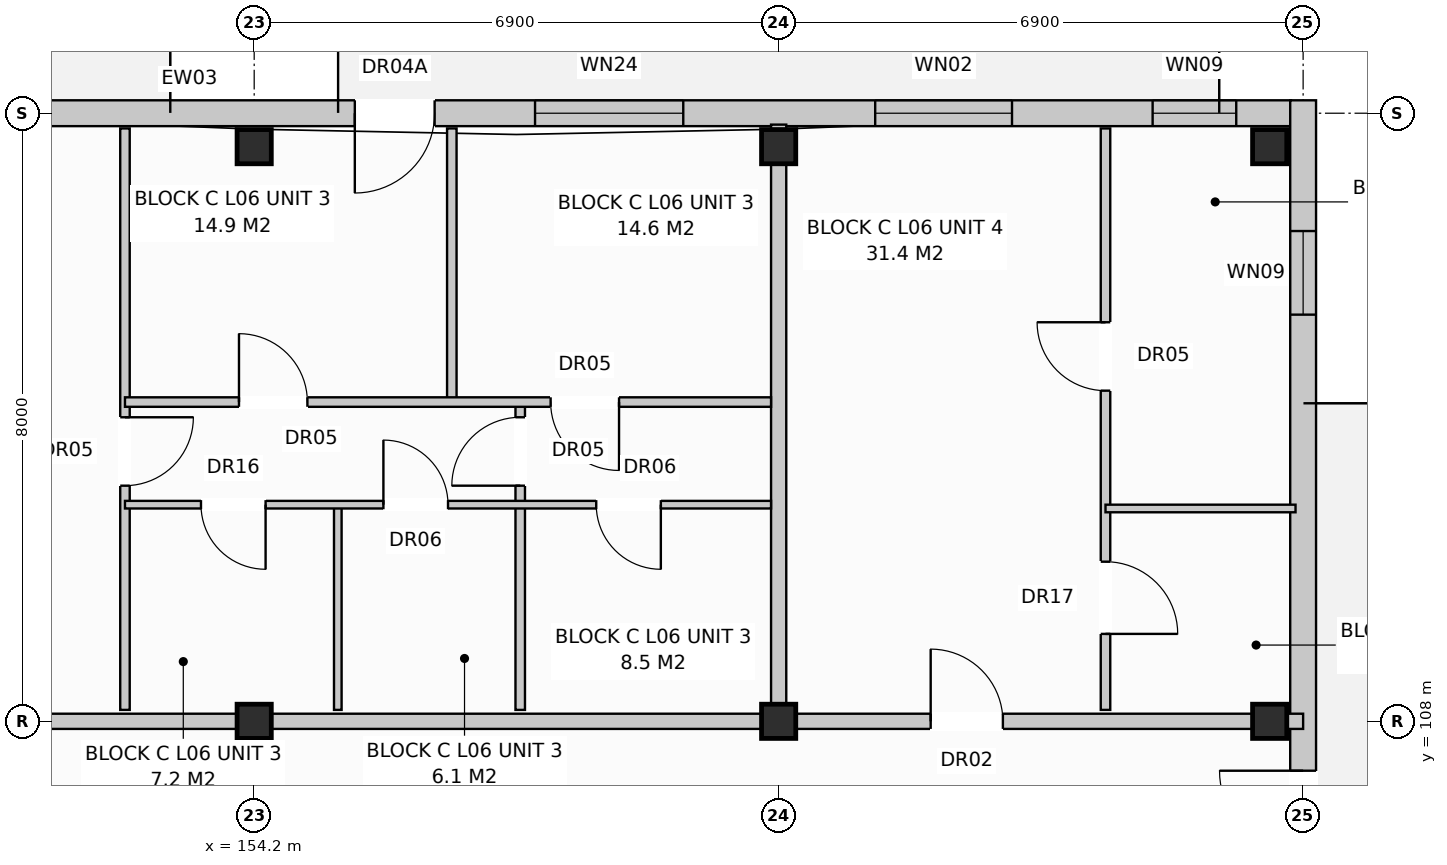
"""IFC4 building model, lengths in metres.
Left out: names, types, materials, properties, quantities, classifications, styles, units other than length and angle.
Written with IfcOpenShell. Run it as: python <this file> out.ifc"""

import sys

from ifc_helpers import new_model, si_unit, direction, frame, frame_2d, origin, origin_with_axes, origin_2d, place, context, subcontext, project, spatial, rectangle, extrude, element, fill, save


model = new_model("IFC4")
c1 = context("Model", 3, precision=1e-05, world=origin(), true_north=direction((0.0, 1.0)))
c2 = subcontext(c1, "Body", "Model", "MODEL_VIEW")
j1 = project(units=[si_unit("LENGTHUNIT", "METRE"), si_unit("PLANEANGLEUNIT", "RADIAN")], contexts=[c1])
p1 = place(None, origin())
s1 = spatial("IfcSite", under=j1, at=p1, CompositionType="ELEMENT")
p2 = place(p1, origin())
s2 = spatial("IfcBuilding", under=s1, at=p2, CompositionType="ELEMENT")
p3 = place(p2, frame((0.0, 0.0, 20.8)))
s3 = spatial("IfcBuildingStorey", under=s2, at=p3, CompositionType="ELEMENT", Elevation=20.8)
for number, where, z_axis, x_axis in (
    (1, (154.2, 108.0, 0.0), (0.0, 0.0, 1.0), (1.0, 0.0, 0.0)),
    (2, (154.2, 115.56, 0.0), (0.0, 0.0, 1.0), (1.0, 0.0, 0.0)),
    (3, (161.1, 108.0, 0.0), (0.0, 0.0, 1.0), (1.0, 0.0, 0.0)),
    (4, (161.1, 115.56, 0.0), (0.0, 0.0, 1.0), (1.0, 0.0, 0.0)),
    (5, (167.56, 108.0, 0.0), (0.0, 0.0, 1.0), (1.0, 0.0, 0.0)),
    (6, (167.56, 115.56, 0.0), (0.0, 0.0, 1.0), (1.0, 0.0, 0.0)),
):
    element("IfcColumn", number, at=place(p3, frame(where, z_axis=z_axis, x_axis=x_axis)), inside=s3, PredefinedType="COLUMN", context=c2, shape_type="SweptSolid", body=[
        extrude(rectangle(XDim=0.45, YDim=0.45, at=origin_2d()), origin(), (0.0, 0.0, 1.0), 3.2),
    ])
p4 = place(p3, frame((126.76, 116.0, 0.0), z_axis=(0.0, 0.0, 1.0), x_axis=(1.0, 0.0, 0.0)))
e7 = element("IfcWall", 7, at=p4, inside=s3, PredefinedType="STANDARD", context=c2, shape_type="SweptSolid", body=[
    extrude(rectangle(XDim=41.08, YDim=0.34, at=frame_2d((20.54, 0.0))), origin(), (0.0, 0.0, 1.0), 2.95),
])
p5 = place(p4, frame((2.464, 0.0, 0.0)))
e8 = element("IfcOpeningElement", 8, at=p5, cuts=e7, PredefinedType="OPENING", context=c2, shape_type="SweptSolid", body=[
    extrude(rectangle(XDim=1.05, YDim=2.12, at=frame_2d((0.525, 1.06))), frame((0.0, 0.182, 0.0), z_axis=(0.0, -1.0, 0.0), x_axis=(1.0, 0.0, 0.0)), (0.0, 0.0, 1.0), 0.364),
])
p6 = place(p4, frame((18.86, 0.0, 0.0)))
e9 = element("IfcOpeningElement", 9, at=p6, cuts=e7, PredefinedType="OPENING", context=c2, shape_type="SweptSolid", body=[
    extrude(rectangle(XDim=1.05, YDim=2.12, at=frame_2d((0.525, 1.06))), frame((0.0, 0.182, 0.0), z_axis=(0.0, -1.0, 0.0), x_axis=(1.0, 0.0, 0.0)), (0.0, 0.0, 1.0), 0.364),
])
p7 = place(p4, frame((28.764, 0.0, 0.0)))
e10 = element("IfcOpeningElement", 10, at=p7, cuts=e7, PredefinedType="OPENING", context=c2, shape_type="SweptSolid", body=[
    extrude(rectangle(XDim=1.05, YDim=2.12, at=frame_2d((0.525, 1.06))), frame((0.0, 0.182, 0.0), z_axis=(0.0, -1.0, 0.0), x_axis=(1.0, 0.0, 0.0)), (0.0, 0.0, 1.0), 0.364),
])
p8 = place(p4, frame((0.76, 0.0, 0.72)))
e11 = element("IfcOpeningElement", 11, at=p8, cuts=e7, PredefinedType="OPENING", context=c2, shape_type="SweptSolid", body=[
    extrude(rectangle(XDim=1.1, YDim=1.5, at=frame_2d((0.55, 0.75))), frame((0.0, 0.182, 0.0), z_axis=(0.0, -1.0, 0.0), x_axis=(1.0, 0.0, 0.0)), (0.0, 0.0, 1.0), 0.364),
])
p9 = place(p4, frame((4.31, 0.0, 0.8)))
e12 = element("IfcOpeningElement", 12, at=p9, cuts=e7, PredefinedType="OPENING", context=c2, shape_type="SweptSolid", body=[
    extrude(rectangle(XDim=1.8, YDim=1.7, at=frame_2d((0.9, 0.85))), frame((0.0, 0.182, 0.0), z_axis=(0.0, -1.0, 0.0), x_axis=(1.0, 0.0, 0.0)), (0.0, 0.0, 1.0), 0.364),
])
p10 = place(p4, frame((7.96, 0.0, 0.72)))
e13 = element("IfcOpeningElement", 13, at=p10, cuts=e7, PredefinedType="OPENING", context=c2, shape_type="SweptSolid", body=[
    extrude(rectangle(XDim=1.9, YDim=1.85, at=frame_2d((0.95, 0.925))), frame((0.0, 0.182, 0.0), z_axis=(0.0, -1.0, 0.0), x_axis=(1.0, 0.0, 0.0)), (0.0, 0.0, 1.0), 0.364),
])
p11 = place(p4, frame((11.66, 0.0, 0.72)))
e14 = element("IfcOpeningElement", 14, at=p11, cuts=e7, PredefinedType="OPENING", context=c2, shape_type="SweptSolid", body=[
    extrude(rectangle(XDim=1.1, YDim=1.5, at=frame_2d((0.55, 0.75))), frame((0.0, 0.182, 0.0), z_axis=(0.0, -1.0, 0.0), x_axis=(1.0, 0.0, 0.0)), (0.0, 0.0, 1.0), 0.364),
])
p12 = place(p4, frame((16.81, 0.0, 0.8)))
e15 = element("IfcOpeningElement", 15, at=p12, cuts=e7, PredefinedType="OPENING", context=c2, shape_type="SweptSolid", body=[
    extrude(rectangle(XDim=1.8, YDim=1.7, at=frame_2d((0.9, 0.85))), frame((0.0, 0.182, 0.0), z_axis=(0.0, -1.0, 0.0), x_axis=(1.0, 0.0, 0.0)), (0.0, 0.0, 1.0), 0.364),
])
p13 = place(p4, frame((22.26, 0.0, 0.72)))
e16 = element("IfcOpeningElement", 16, at=p13, cuts=e7, PredefinedType="OPENING", context=c2, shape_type="SweptSolid", body=[
    extrude(rectangle(XDim=1.9, YDim=1.85, at=frame_2d((0.95, 0.925))), frame((0.0, 0.182, 0.0), z_axis=(0.0, -1.0, 0.0), x_axis=(1.0, 0.0, 0.0)), (0.0, 0.0, 1.0), 0.364),
])
p14 = place(p4, frame((31.135, 0.0, 0.8)))
e17 = element("IfcOpeningElement", 17, at=p14, cuts=e7, PredefinedType="OPENING", context=c2, shape_type="SweptSolid", body=[
    extrude(rectangle(XDim=1.95, YDim=1.65, at=frame_2d((0.975, 0.825))), frame((0.0, 0.182, 0.0), z_axis=(0.0, -1.0, 0.0), x_axis=(1.0, 0.0, 0.0)), (0.0, 0.0, 1.0), 0.364),
])
p15 = place(p4, frame((35.61, 0.0, 0.8)))
e18 = element("IfcOpeningElement", 18, at=p15, cuts=e7, PredefinedType="OPENING", context=c2, shape_type="SweptSolid", body=[
    extrude(rectangle(XDim=1.8, YDim=1.7, at=frame_2d((0.9, 0.85))), frame((0.0, 0.182, 0.0), z_axis=(0.0, -1.0, 0.0), x_axis=(1.0, 0.0, 0.0)), (0.0, 0.0, 1.0), 0.364),
])
p16 = place(p4, frame((39.26, 0.0, 0.72)))
e19 = element("IfcOpeningElement", 19, at=p16, cuts=e7, PredefinedType="OPENING", context=c2, shape_type="SweptSolid", body=[
    extrude(rectangle(XDim=1.1, YDim=1.5, at=frame_2d((0.55, 0.75))), frame((0.0, 0.182, 0.0), z_axis=(0.0, -1.0, 0.0), x_axis=(1.0, 0.0, 0.0)), (0.0, 0.0, 1.0), 0.364),
])
p17 = place(p3, frame((168.0, 97.43, 0.0), z_axis=(0.0, 0.0, 1.0), x_axis=(0.0, 1.0, 0.0)))
e20 = element("IfcWall", 20, at=p17, inside=s3, PredefinedType="STANDARD", context=c2, shape_type="SweptSolid", body=[
    extrude(rectangle(XDim=18.74, YDim=0.34, at=frame_2d((9.37, 0.0))), origin(), (0.0, 0.0, 1.0), 2.95),
])
p18 = place(p17, frame((8.82, 0.0, 0.0)))
e21 = element("IfcOpeningElement", 21, at=p18, cuts=e20, PredefinedType="OPENING", context=c2, shape_type="SweptSolid", body=[
    extrude(rectangle(XDim=1.1, YDim=2.1, at=frame_2d((0.55, 1.05))), frame((0.0, 0.182, 0.0), z_axis=(0.0, -1.0, 0.0), x_axis=(1.0, 0.0, 0.0)), (0.0, 0.0, 1.0), 0.364),
])
p19 = place(p17, frame((1.72, 0.0, 0.72)))
e22 = element("IfcOpeningElement", 22, at=p19, cuts=e20, PredefinedType="OPENING", context=c2, shape_type="SweptSolid", body=[
    extrude(rectangle(XDim=1.1, YDim=1.5, at=frame_2d((0.55, 0.75))), frame((0.0, 0.182, 0.0), z_axis=(0.0, -1.0, 0.0), x_axis=(1.0, 0.0, 0.0)), (0.0, 0.0, 1.0), 0.364),
])
p20 = place(p17, frame((15.92, 0.0, 0.72)))
e23 = element("IfcOpeningElement", 23, at=p20, cuts=e20, PredefinedType="OPENING", context=c2, shape_type="SweptSolid", body=[
    extrude(rectangle(XDim=1.1, YDim=1.5, at=frame_2d((0.55, 0.75))), frame((0.0, 0.182, 0.0), z_axis=(0.0, -1.0, 0.0), x_axis=(1.0, 0.0, 0.0)), (0.0, 0.0, 1.0), 0.364),
])
p21 = place(p3, frame((161.1, 108.15, 0.0), z_axis=(0.0, 0.0, 1.0), x_axis=(0.0, 1.0, 0.0)))
e24 = element("IfcWall", 24, at=p21, inside=s3, PredefinedType="PARTITIONING", context=c2, shape_type="SweptSolid", body=[
    extrude(rectangle(XDim=7.7, YDim=0.2, at=frame_2d((3.85, 0.0))), origin(), (0.0, 0.0, 1.0), 2.39),
])
p22 = place(p3, frame((147.3, 108.0, 0.0), z_axis=(0.0, 0.0, 1.0), x_axis=(1.0, 0.0, 0.0)))
e25 = element("IfcWall", 25, at=p22, inside=s3, PredefinedType="PARTITIONING", context=c2, shape_type="SweptSolid", body=[
    extrude(rectangle(XDim=13.8, YDim=0.2, at=frame_2d((6.9, 0.0))), origin(), (0.0, 0.0, 1.0), 2.39),
])
p23 = place(p22, frame((2.4, 0.0, 0.0)))
e26 = element("IfcOpeningElement", 26, at=p23, cuts=e25, PredefinedType="OPENING", context=c2, shape_type="SweptSolid", body=[
    extrude(rectangle(XDim=0.95, YDim=2.15, at=frame_2d((0.475, 1.075))), frame((0.0, 0.112, 0.0), z_axis=(0.0, -1.0, 0.0), x_axis=(1.0, 0.0, 0.0)), (0.0, 0.0, 1.0), 0.224),
])
p24 = place(p3, frame((152.5, 108.15, 0.0), z_axis=(0.0, 0.0, 1.0), x_axis=(0.0, 1.0, 0.0)))
e27 = element("IfcWall", 27, at=p24, inside=s3, PredefinedType="PARTITIONING", context=c2, shape_type="SweptSolid", body=[
    extrude(rectangle(XDim=7.65, YDim=0.125, at=frame_2d((3.825, 0.0))), origin(), (0.0, 0.0, 1.0), 2.59),
])
p25 = place(p24, frame((2.95, 0.0, 0.0)))
e28 = element("IfcOpeningElement", 28, at=p25, cuts=e27, PredefinedType="OPENING", context=c2, shape_type="SweptSolid", body=[
    extrude(rectangle(XDim=0.9, YDim=2.1, at=frame_2d((0.45, 1.05))), frame((0.0, 0.074, 0.0), z_axis=(0.0, -1.0, 0.0), x_axis=(1.0, 0.0, 0.0)), (0.0, 0.0, 1.0), 0.149),
])
p26 = place(p3, frame((155.3, 108.15, 0.0), z_axis=(0.0, 0.0, 1.0), x_axis=(0.0, 1.0, 0.0)))
e29 = element("IfcWall", 29, at=p26, inside=s3, PredefinedType="PARTITIONING", context=c2, shape_type="SweptSolid", body=[
    extrude(rectangle(XDim=2.7, YDim=0.1, at=frame_2d((1.35, 0.0))), origin(), (0.0, 0.0, 1.0), 2.95),
])
p27 = place(p3, frame((157.7, 108.15, 0.0), z_axis=(0.0, 0.0, 1.0), x_axis=(0.0, 1.0, 0.0)))
e30 = element("IfcWall", 30, at=p27, inside=s3, PredefinedType="PARTITIONING", context=c2, shape_type="SweptSolid", body=[
    extrude(rectangle(XDim=4.05, YDim=0.125, at=frame_2d((2.025, 0.0))), origin(), (0.0, 0.0, 1.0), 2.95),
])
p28 = place(p27, frame((2.95, 0.0, 0.0)))
e31 = element("IfcOpeningElement", 31, at=p28, cuts=e30, PredefinedType="OPENING", context=c2, shape_type="SweptSolid", body=[
    extrude(rectangle(XDim=0.9, YDim=2.1, at=frame_2d((0.45, 1.05))), frame((0.0, 0.074, 0.0), z_axis=(0.0, -1.0, 0.0), x_axis=(1.0, 0.0, 0.0)), (0.0, 0.0, 1.0), 0.149),
])
p29 = place(p3, frame((156.8, 112.2, 0.0), z_axis=(0.0, 0.0, 1.0), x_axis=(0.0, 1.0, 0.0)))
e32 = element("IfcWall", 32, at=p29, inside=s3, PredefinedType="PARTITIONING", context=c2, shape_type="SweptSolid", body=[
    extrude(rectangle(XDim=3.6, YDim=0.125, at=frame_2d((1.8, 0.0))), origin(), (0.0, 0.0, 1.0), 2.95),
])
p30 = place(p3, frame((152.5, 110.85, 0.0), z_axis=(0.0, 0.0, 1.0), x_axis=(1.0, 0.0, 0.0)))
e33 = element("IfcWall", 33, at=p30, inside=s3, PredefinedType="PARTITIONING", context=c2, shape_type="SweptSolid", body=[
    extrude(rectangle(XDim=8.5, YDim=0.1, at=frame_2d((4.25, 0.0))), origin(), (0.0, 0.0, 1.0), 2.95),
])
p31 = place(p30, frame((1.0, 0.0, 0.0)))
e34 = element("IfcOpeningElement", 34, at=p31, cuts=e33, PredefinedType="OPENING", context=c2, shape_type="SweptSolid", body=[
    extrude(rectangle(XDim=0.85, YDim=2.1, at=frame_2d((0.425, 1.05))), frame((0.0, 0.062, 0.0), z_axis=(0.0, -1.0, 0.0), x_axis=(1.0, 0.0, 0.0)), (0.0, 0.0, 1.0), 0.124),
])
p32 = place(p30, frame((3.4, 0.0, 0.0)))
e35 = element("IfcOpeningElement", 35, at=p32, cuts=e33, PredefinedType="OPENING", context=c2, shape_type="SweptSolid", body=[
    extrude(rectangle(XDim=0.85, YDim=2.05, at=frame_2d((0.425, 1.025))), frame((0.0, 0.062, 0.0), z_axis=(0.0, -1.0, 0.0), x_axis=(1.0, 0.0, 0.0)), (0.0, 0.0, 1.0), 0.124),
])
p33 = place(p30, frame((6.2, 0.0, 0.0)))
e36 = element("IfcOpeningElement", 36, at=p33, cuts=e33, PredefinedType="OPENING", context=c2, shape_type="SweptSolid", body=[
    extrude(rectangle(XDim=0.85, YDim=2.05, at=frame_2d((0.425, 1.025))), frame((0.0, 0.062, 0.0), z_axis=(0.0, -1.0, 0.0), x_axis=(1.0, 0.0, 0.0)), (0.0, 0.0, 1.0), 0.124),
])
p34 = place(p3, frame((152.5, 112.2, 0.0), z_axis=(0.0, 0.0, 1.0), x_axis=(1.0, 0.0, 0.0)))
e37 = element("IfcWall", 37, at=p34, inside=s3, PredefinedType="PARTITIONING", context=c2, shape_type="SweptSolid", body=[
    extrude(rectangle(XDim=8.5, YDim=0.125, at=frame_2d((4.25, 0.0))), origin(), (0.0, 0.0, 1.0), 2.95),
])
p35 = place(p34, frame((1.5, 0.0, 0.0)))
e38 = element("IfcOpeningElement", 38, at=p35, cuts=e37, PredefinedType="OPENING", context=c2, shape_type="SweptSolid", body=[
    extrude(rectangle(XDim=0.9, YDim=2.1, at=frame_2d((0.45, 1.05))), frame((0.0, 0.074, 0.0), z_axis=(0.0, -1.0, 0.0), x_axis=(1.0, 0.0, 0.0)), (0.0, 0.0, 1.0), 0.149),
])
p36 = place(p34, frame((5.6, 0.0, 0.0)))
e39 = element("IfcOpeningElement", 39, at=p36, cuts=e37, PredefinedType="OPENING", context=c2, shape_type="SweptSolid", body=[
    extrude(rectangle(XDim=0.9, YDim=2.1, at=frame_2d((0.45, 1.05))), frame((0.0, 0.074, 0.0), z_axis=(0.0, -1.0, 0.0), x_axis=(1.0, 0.0, 0.0)), (0.0, 0.0, 1.0), 0.149),
])
p37 = place(p3, frame((161.1, 108.0, 0.0), z_axis=(0.0, 0.0, 1.0), x_axis=(1.0, 0.0, 0.0)))
e40 = element("IfcWall", 40, at=p37, inside=s3, PredefinedType="PARTITIONING", context=c2, shape_type="SweptSolid", body=[
    extrude(rectangle(XDim=6.9, YDim=0.2, at=frame_2d((3.45, 0.0))), origin(), (0.0, 0.0, 1.0), 2.39),
])
p38 = place(p37, frame((2.0, 0.0, 0.0)))
e41 = element("IfcOpeningElement", 41, at=p38, cuts=e40, PredefinedType="OPENING", context=c2, shape_type="SweptSolid", body=[
    extrude(rectangle(XDim=0.95, YDim=2.15, at=frame_2d((0.475, 1.075))), frame((0.0, 0.112, 0.0), z_axis=(0.0, -1.0, 0.0), x_axis=(1.0, 0.0, 0.0)), (0.0, 0.0, 1.0), 0.224),
])
p39 = place(p3, frame((165.4, 108.15, 0.0), z_axis=(0.0, 0.0, 1.0), x_axis=(0.0, 1.0, 0.0)))
e42 = element("IfcWall", 42, at=p39, inside=s3, PredefinedType="PARTITIONING", context=c2, shape_type="SweptSolid", body=[
    extrude(rectangle(XDim=7.65, YDim=0.125, at=frame_2d((3.825, 0.0))), origin(), (0.0, 0.0, 1.0), 2.95),
])
p40 = place(p39, frame((1.0, 0.0, 0.0)))
e43 = element("IfcOpeningElement", 43, at=p40, cuts=e42, PredefinedType="OPENING", context=c2, shape_type="SweptSolid", body=[
    extrude(rectangle(XDim=0.95, YDim=2.1, at=frame_2d((0.475, 1.05))), frame((0.0, 0.074, 0.0), z_axis=(0.0, -1.0, 0.0), x_axis=(1.0, 0.0, 0.0)), (0.0, 0.0, 1.0), 0.149),
])
p41 = place(p39, frame((4.2, 0.0, 0.0)))
e44 = element("IfcOpeningElement", 44, at=p41, cuts=e42, PredefinedType="OPENING", context=c2, shape_type="SweptSolid", body=[
    extrude(rectangle(XDim=0.9, YDim=2.1, at=frame_2d((0.45, 1.05))), frame((0.0, 0.074, 0.0), z_axis=(0.0, -1.0, 0.0), x_axis=(1.0, 0.0, 0.0)), (0.0, 0.0, 1.0), 0.149),
])
p42 = place(p3, frame((165.4, 110.8, 0.0), z_axis=(0.0, 0.0, 1.0), x_axis=(1.0, 0.0, 0.0)))
e45 = element("IfcWall", 45, at=p42, inside=s3, PredefinedType="PARTITIONING", context=c2, shape_type="SweptSolid", body=[
    extrude(rectangle(XDim=2.5, YDim=0.1, at=frame_2d((1.25, 0.0))), origin(), (0.0, 0.0, 1.0), 2.95),
])
p43 = place(p7, frame((1.05, 0.0, 0.0), z_axis=(0.0, 0.0, 1.0), x_axis=(-1.0, 0.0, 0.0)))
e46 = element("IfcDoor", 46, at=p43, inside=s3, OperationType="SINGLE_SWING_LEFT", PredefinedType="DOOR", context=c2, shape_type="SweptSolid", body=[
    extrude(rectangle(XDim=1.05, YDim=2.12, at=frame_2d((0.525, 1.06))), frame((0.0, 0.025, 0.0), z_axis=(0.0, -1.0, 0.0), x_axis=(1.0, 0.0, 0.0)), (0.0, 0.0, 1.0), 0.05),
])
fill(e10, e46)
p44 = place(p14, origin_with_axes())
e47 = element("IfcWindow", 47, at=p44, inside=s3, PartitioningType="SINGLE_PANEL", PredefinedType="WINDOW", context=c2, shape_type="SweptSolid", body=[
    extrude(rectangle(XDim=1.95, YDim=1.65, at=frame_2d((0.975, 0.825))), frame((0.0, 0.03, 0.0), z_axis=(0.0, -1.0, 0.0), x_axis=(1.0, 0.0, 0.0)), (0.0, 0.0, 1.0), 0.06),
])
fill(e17, e47)
p45 = place(p15, origin_with_axes())
e48 = element("IfcWindow", 48, at=p45, inside=s3, PartitioningType="SINGLE_PANEL", PredefinedType="WINDOW", context=c2, shape_type="SweptSolid", body=[
    extrude(rectangle(XDim=1.8, YDim=1.7, at=frame_2d((0.9, 0.85))), frame((0.0, 0.03, 0.0), z_axis=(0.0, -1.0, 0.0), x_axis=(1.0, 0.0, 0.0)), (0.0, 0.0, 1.0), 0.06),
])
fill(e18, e48)
p46 = place(p16, origin_with_axes())
e49 = element("IfcWindow", 49, at=p46, inside=s3, PartitioningType="SINGLE_PANEL", PredefinedType="WINDOW", context=c2, shape_type="SweptSolid", body=[
    extrude(rectangle(XDim=1.1, YDim=1.5, at=frame_2d((0.55, 0.75))), frame((0.0, 0.03, 0.0), z_axis=(0.0, -1.0, 0.0), x_axis=(1.0, 0.0, 0.0)), (0.0, 0.0, 1.0), 0.06),
])
fill(e19, e49)
p47 = place(p18, origin_with_axes())
e50 = element("IfcDoor", 50, at=p47, inside=s3, OperationType="SINGLE_SWING_RIGHT", PredefinedType="DOOR", context=c2, shape_type="SweptSolid", body=[
    extrude(rectangle(XDim=1.1, YDim=2.1, at=frame_2d((0.55, 1.05))), frame((0.0, 0.025, 0.0), z_axis=(0.0, -1.0, 0.0), x_axis=(1.0, 0.0, 0.0)), (0.0, 0.0, 1.0), 0.05),
])
fill(e21, e50)
p48 = place(p20, origin_with_axes())
e51 = element("IfcWindow", 51, at=p48, inside=s3, PartitioningType="SINGLE_PANEL", PredefinedType="WINDOW", context=c2, shape_type="SweptSolid", body=[
    extrude(rectangle(XDim=1.1, YDim=1.5, at=frame_2d((0.55, 0.75))), frame((0.0, 0.03, 0.0), z_axis=(0.0, -1.0, 0.0), x_axis=(1.0, 0.0, 0.0)), (0.0, 0.0, 1.0), 0.06),
])
fill(e23, e51)
p49 = place(p25, frame((0.9, 0.0, 0.0), z_axis=(0.0, 0.0, 1.0), x_axis=(-1.0, 0.0, 0.0)))
e52 = element("IfcDoor", 52, at=p49, inside=s3, OperationType="SINGLE_SWING_RIGHT", PredefinedType="DOOR", context=c2, shape_type="SweptSolid", body=[
    extrude(rectangle(XDim=0.9, YDim=2.1, at=frame_2d((0.45, 1.05))), frame((0.0, 0.025, 0.0), z_axis=(0.0, -1.0, 0.0), x_axis=(1.0, 0.0, 0.0)), (0.0, 0.0, 1.0), 0.05),
])
fill(e28, e52)
p50 = place(p28, origin_with_axes())
e53 = element("IfcDoor", 53, at=p50, inside=s3, OperationType="SINGLE_SWING_LEFT", PredefinedType="DOOR", context=c2, shape_type="SweptSolid", body=[
    extrude(rectangle(XDim=0.9, YDim=2.1, at=frame_2d((0.45, 1.05))), frame((0.0, 0.025, 0.0), z_axis=(0.0, -1.0, 0.0), x_axis=(1.0, 0.0, 0.0)), (0.0, 0.0, 1.0), 0.05),
])
fill(e31, e53)
p51 = place(p31, frame((0.85, 0.0, 0.0), z_axis=(0.0, 0.0, 1.0), x_axis=(-1.0, 0.0, 0.0)))
e54 = element("IfcDoor", 54, at=p51, inside=s3, OperationType="SINGLE_SWING_RIGHT", PredefinedType="DOOR", context=c2, shape_type="SweptSolid", body=[
    extrude(rectangle(XDim=0.85, YDim=2.1, at=frame_2d((0.425, 1.05))), frame((0.0, 0.025, 0.0), z_axis=(0.0, -1.0, 0.0), x_axis=(1.0, 0.0, 0.0)), (0.0, 0.0, 1.0), 0.05),
])
fill(e34, e54)
p52 = place(p32, origin_with_axes())
e55 = element("IfcDoor", 55, at=p52, inside=s3, OperationType="SINGLE_SWING_LEFT", PredefinedType="DOOR", context=c2, shape_type="SweptSolid", body=[
    extrude(rectangle(XDim=0.85, YDim=2.05, at=frame_2d((0.425, 1.025))), frame((0.0, 0.025, 0.0), z_axis=(0.0, -1.0, 0.0), x_axis=(1.0, 0.0, 0.0)), (0.0, 0.0, 1.0), 0.05),
])
fill(e35, e55)
p53 = place(p33, frame((0.85, 0.0, 0.0), z_axis=(0.0, 0.0, 1.0), x_axis=(-1.0, 0.0, 0.0)))
e56 = element("IfcDoor", 56, at=p53, inside=s3, OperationType="SINGLE_SWING_RIGHT", PredefinedType="DOOR", context=c2, shape_type="SweptSolid", body=[
    extrude(rectangle(XDim=0.85, YDim=2.05, at=frame_2d((0.425, 1.025))), frame((0.0, 0.025, 0.0), z_axis=(0.0, -1.0, 0.0), x_axis=(1.0, 0.0, 0.0)), (0.0, 0.0, 1.0), 0.05),
])
fill(e36, e56)
p54 = place(p35, origin_with_axes())
e57 = element("IfcDoor", 57, at=p54, inside=s3, OperationType="SINGLE_SWING_LEFT", PredefinedType="DOOR", context=c2, shape_type="SweptSolid", body=[
    extrude(rectangle(XDim=0.9, YDim=2.1, at=frame_2d((0.45, 1.05))), frame((0.0, 0.025, 0.0), z_axis=(0.0, -1.0, 0.0), x_axis=(1.0, 0.0, 0.0)), (0.0, 0.0, 1.0), 0.05),
])
fill(e38, e57)
p55 = place(p36, frame((0.9, 0.0, 0.0), z_axis=(0.0, 0.0, 1.0), x_axis=(-1.0, 0.0, 0.0)))
e58 = element("IfcDoor", 58, at=p55, inside=s3, OperationType="SINGLE_SWING_RIGHT", PredefinedType="DOOR", context=c2, shape_type="SweptSolid", body=[
    extrude(rectangle(XDim=0.9, YDim=2.1, at=frame_2d((0.45, 1.05))), frame((0.0, 0.025, 0.0), z_axis=(0.0, -1.0, 0.0), x_axis=(1.0, 0.0, 0.0)), (0.0, 0.0, 1.0), 0.05),
])
fill(e39, e58)
p56 = place(p38, origin_with_axes())
e59 = element("IfcDoor", 59, at=p56, inside=s3, OperationType="SINGLE_SWING_LEFT", PredefinedType="DOOR", context=c2, shape_type="SweptSolid", body=[
    extrude(rectangle(XDim=0.95, YDim=2.15, at=frame_2d((0.475, 1.075))), frame((0.0, 0.025, 0.0), z_axis=(0.0, -1.0, 0.0), x_axis=(1.0, 0.0, 0.0)), (0.0, 0.0, 1.0), 0.05),
])
fill(e41, e59)
p57 = place(p40, frame((0.95, 0.0, 0.0), z_axis=(0.0, 0.0, 1.0), x_axis=(-1.0, 0.0, 0.0)))
e60 = element("IfcDoor", 60, at=p57, inside=s3, OperationType="SINGLE_SWING_LEFT", PredefinedType="DOOR", context=c2, shape_type="SweptSolid", body=[
    extrude(rectangle(XDim=0.95, YDim=2.1, at=frame_2d((0.475, 1.05))), frame((0.0, 0.025, 0.0), z_axis=(0.0, -1.0, 0.0), x_axis=(1.0, 0.0, 0.0)), (0.0, 0.0, 1.0), 0.05),
])
fill(e43, e60)
p58 = place(p41, origin_with_axes())
e61 = element("IfcDoor", 61, at=p58, inside=s3, OperationType="SINGLE_SWING_RIGHT", PredefinedType="DOOR", context=c2, shape_type="SweptSolid", body=[
    extrude(rectangle(XDim=0.9, YDim=2.1, at=frame_2d((0.45, 1.05))), frame((0.0, 0.025, 0.0), z_axis=(0.0, -1.0, 0.0), x_axis=(1.0, 0.0, 0.0)), (0.0, 0.0, 1.0), 0.05),
])
fill(e44, e61)
save(model, sys.argv[1])
